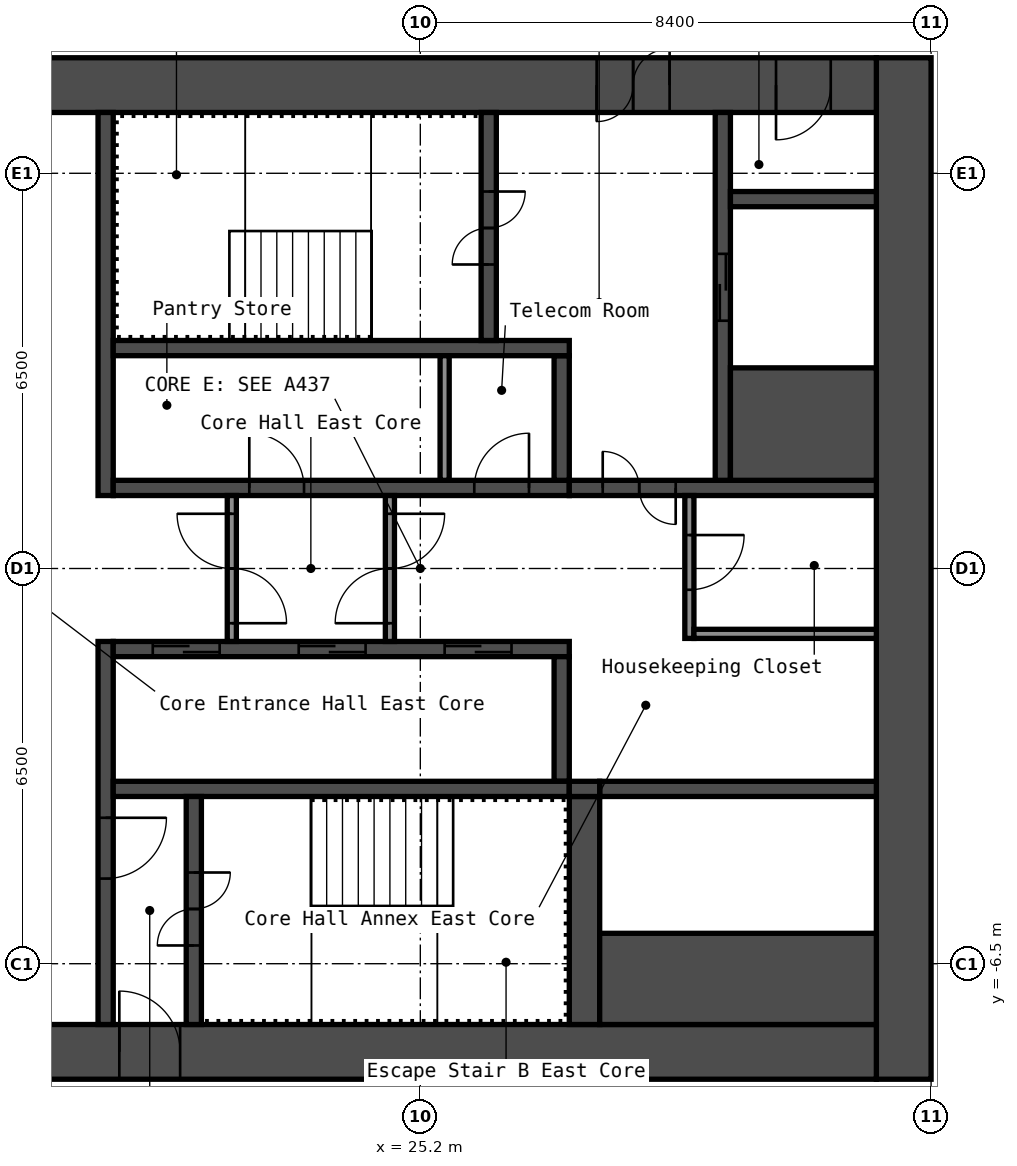
"""IFC4 building model, lengths in metres.
Left out: names, types, materials, properties, quantities, classifications, styles, units other than length and angle.
Written with IfcOpenShell. Run it as: python <this file> out.ifc"""

import sys

from ifc_helpers import new_model, si_unit, direction, frame, frame_2d, origin, place, context, subcontext, project, spatial, rectangle, extrude, element, fill, save


model = new_model("IFC4")
c1 = context("Model", 3, precision=1e-05, world=origin(), true_north=direction((0.0, 1.0)))
c2 = subcontext(c1, "Body", "Model", "MODEL_VIEW")
j1 = project(units=[si_unit("LENGTHUNIT", "METRE"), si_unit("PLANEANGLEUNIT", "RADIAN")], contexts=[c1])
p1 = place(None, origin())
s1 = spatial("IfcSite", under=j1, at=p1, CompositionType="ELEMENT")
p2 = place(p1, origin())
s2 = spatial("IfcBuilding", under=s1, at=p2, CompositionType="ELEMENT")
p3 = place(p2, frame((0.0, 0.0, 261.4)))
s3 = spatial("IfcBuildingStorey", under=s2, at=p3, CompositionType="ELEMENT", Elevation=261.4)
p4 = place(p3, frame((33.15, -8.4, 0.0), z_axis=(0.0, 0.0, 1.0), x_axis=(0.0, 1.0, 0.0)))
e1 = element("IfcWall", 1, at=p4, inside=s3, PredefinedType="SHEAR", context=c2, shape_type="SweptSolid", body=[
    extrude(rectangle(XDim=16.8, YDim=0.9, at=frame_2d((8.4, 0.0))), origin(), (0.0, 0.0, 1.0), 2.75),
])
p5 = place(p3, frame((17.7, 7.95, 0.0), z_axis=(0.0, 0.0, 1.0), x_axis=(1.0, 0.0, 0.0)))
e2 = element("IfcWall", 2, at=p5, inside=s3, PredefinedType="SHEAR", context=c2, shape_type="SweptSolid", body=[
    extrude(rectangle(XDim=15.0, YDim=0.9, at=frame_2d((7.5, 0.0))), origin(), (0.0, 0.0, 1.0), 2.75),
])
p6 = place(p5, frame((10.4, 0.0, 0.0)))
e3 = element("IfcOpeningElement", 3, at=p6, cuts=e2, PredefinedType="OPENING", context=c2, shape_type="SweptSolid", body=[
    extrude(rectangle(XDim=1.2, YDim=2.1, at=frame_2d((0.6, 1.05))), frame((0.0, 0.46, 0.0), z_axis=(0.0, -1.0, 0.0), x_axis=(1.0, 0.0, 0.0)), (0.0, 0.0, 1.0), 0.92),
])
p7 = place(p5, frame((13.35, 0.0, 0.0)))
e4 = element("IfcOpeningElement", 4, at=p7, cuts=e2, PredefinedType="OPENING", context=c2, shape_type="SweptSolid", body=[
    extrude(rectangle(XDim=0.9, YDim=2.1, at=frame_2d((0.45, 1.05))), frame((0.0, 0.46, 0.0), z_axis=(0.0, -1.0, 0.0), x_axis=(1.0, 0.0, 0.0)), (0.0, 0.0, 1.0), 0.92),
])
p8 = place(p3, frame((17.7, -7.95, 0.0), z_axis=(0.0, 0.0, 1.0), x_axis=(1.0, 0.0, 0.0)))
e5 = element("IfcWall", 5, at=p8, inside=s3, PredefinedType="SHEAR", context=c2, shape_type="SweptSolid", body=[
    extrude(rectangle(XDim=15.0, YDim=0.9, at=frame_2d((7.5, 0.0))), origin(), (0.0, 0.0, 1.0), 2.75),
])
p9 = place(p8, frame((2.55, 0.0, 0.0)))
e6 = element("IfcOpeningElement", 6, at=p9, cuts=e5, PredefinedType="OPENING", context=c2, shape_type="SweptSolid", body=[
    extrude(rectangle(XDim=1.0, YDim=2.1, at=frame_2d((0.5, 1.05))), frame((0.0, 0.46, 0.0), z_axis=(0.0, -1.0, 0.0), x_axis=(1.0, 0.0, 0.0)), (0.0, 0.0, 1.0), 0.92),
])
p10 = place(p3, frame((20.025, 1.2, 0.0), z_axis=(0.0, 0.0, 1.0), x_axis=(0.0, 1.0, 0.0)))
e7 = element("IfcWall", 7, at=p10, inside=s3, PredefinedType="SHEAR", context=c2, shape_type="SweptSolid", body=[
    extrude(rectangle(XDim=6.3, YDim=0.25, at=frame_2d((3.15, 0.0))), origin(), (0.0, 0.0, 1.0), 2.75),
])
p11 = place(p3, frame((20.025, -7.5, 0.0), z_axis=(0.0, 0.0, 1.0), x_axis=(0.0, 1.0, 0.0)))
e8 = element("IfcWall", 8, at=p11, inside=s3, PredefinedType="SHEAR", context=c2, shape_type="SweptSolid", body=[
    extrude(rectangle(XDim=6.3, YDim=0.25, at=frame_2d((3.15, 0.0))), origin(), (0.0, 0.0, 1.0), 2.75),
])
p12 = place(p11, frame((2.4, 0.0, 0.0)))
e9 = element("IfcOpeningElement", 9, at=p12, cuts=e8, PredefinedType="OPENING", context=c2, shape_type="SweptSolid", body=[
    extrude(rectangle(XDim=1.0, YDim=2.1, at=frame_2d((0.5, 1.05))), frame((0.0, 0.135, 0.0), z_axis=(0.0, -1.0, 0.0), x_axis=(1.0, 0.0, 0.0)), (0.0, 0.0, 1.0), 0.27),
])
p13 = place(p3, frame((20.15, 1.325, 0.0), z_axis=(0.0, 0.0, 1.0), x_axis=(1.0, 0.0, 0.0)))
e10 = element("IfcWall", 10, at=p13, inside=s3, PredefinedType="SHEAR", context=c2, shape_type="SweptSolid", body=[
    extrude(rectangle(XDim=7.5, YDim=0.25, at=frame_2d((3.75, 0.0))), origin(), (0.0, 0.0, 1.0), 2.75),
])
p14 = place(p13, frame((2.238, 0.0, 0.0)))
e11 = element("IfcOpeningElement", 11, at=p14, cuts=e10, PredefinedType="OPENING", context=c2, shape_type="SweptSolid", body=[
    extrude(rectangle(XDim=0.9, YDim=2.1, at=frame_2d((0.45, 1.05))), frame((0.0, 0.135, 0.0), z_axis=(0.0, -1.0, 0.0), x_axis=(1.0, 0.0, 0.0)), (0.0, 0.0, 1.0), 0.27),
])
p15 = place(p13, frame((5.938, 0.0, 0.0)))
e12 = element("IfcOpeningElement", 12, at=p15, cuts=e10, PredefinedType="OPENING", context=c2, shape_type="SweptSolid", body=[
    extrude(rectangle(XDim=0.9, YDim=2.1, at=frame_2d((0.45, 1.05))), frame((0.0, 0.135, 0.0), z_axis=(0.0, -1.0, 0.0), x_axis=(1.0, 0.0, 0.0)), (0.0, 0.0, 1.0), 0.27),
])
p16 = place(p3, frame((27.525, 1.45, 0.0), z_axis=(0.0, 0.0, 1.0), x_axis=(0.0, 1.0, 0.0)))
e13 = element("IfcWall", 13, at=p16, inside=s3, PredefinedType="SHEAR", context=c2, shape_type="SweptSolid", body=[
    extrude(rectangle(XDim=2.05, YDim=0.25, at=frame_2d((1.025, 0.0))), origin(), (0.0, 0.0, 1.0), 2.75),
])
p17 = place(p3, frame((20.15, 3.625, 0.0), z_axis=(0.0, 0.0, 1.0), x_axis=(1.0, 0.0, 0.0)))
e14 = element("IfcWall", 14, at=p17, inside=s3, PredefinedType="SHEAR", context=c2, shape_type="SweptSolid", body=[
    extrude(rectangle(XDim=7.5, YDim=0.25, at=frame_2d((3.75, 0.0))), origin(), (0.0, 0.0, 1.0), 2.75),
])
p18 = place(p3, frame((26.325, 3.75, 0.0), z_axis=(0.0, 0.0, 1.0), x_axis=(0.0, 1.0, 0.0)))
e15 = element("IfcWall", 15, at=p18, inside=s3, PredefinedType="SHEAR", context=c2, shape_type="SweptSolid", body=[
    extrude(rectangle(XDim=3.75, YDim=0.25, at=frame_2d((1.875, 0.0))), origin(), (0.0, 0.0, 1.0), 2.75),
])
p19 = place(p18, frame((1.25, 0.0, 0.0)))
e16 = element("IfcOpeningElement", 16, at=p19, cuts=e15, PredefinedType="OPENING", context=c2, shape_type="SweptSolid", body=[
    extrude(rectangle(XDim=1.2, YDim=2.1, at=frame_2d((0.6, 1.05))), frame((0.0, 0.135, 0.0), z_axis=(0.0, -1.0, 0.0), x_axis=(1.0, 0.0, 0.0)), (0.0, 0.0, 1.0), 0.27),
])
p20 = place(p3, frame((27.65, 1.325, 0.0), z_axis=(0.0, 0.0, 1.0), x_axis=(1.0, 0.0, 0.0)))
e17 = element("IfcWall", 17, at=p20, inside=s3, PredefinedType="SHEAR", context=c2, shape_type="SweptSolid", body=[
    extrude(rectangle(XDim=5.05, YDim=0.25, at=frame_2d((2.525, 0.0))), origin(), (0.0, 0.0, 1.0), 2.75),
])
p21 = place(p20, frame((0.55, 0.0, 0.0)))
e18 = element("IfcOpeningElement", 18, at=p21, cuts=e17, PredefinedType="OPENING", context=c2, shape_type="SweptSolid", body=[
    extrude(rectangle(XDim=1.2, YDim=2.1, at=frame_2d((0.6, 1.05))), frame((0.0, 0.135, 0.0), z_axis=(0.0, -1.0, 0.0), x_axis=(1.0, 0.0, 0.0)), (0.0, 0.0, 1.0), 0.27),
])
p22 = place(p3, frame((30.175, 1.45, 0.0), z_axis=(0.0, 0.0, 1.0), x_axis=(0.0, 1.0, 0.0)))
e19 = element("IfcWall", 19, at=p22, inside=s3, PredefinedType="SHEAR", context=c2, shape_type="SweptSolid", body=[
    extrude(rectangle(XDim=6.05, YDim=0.25, at=frame_2d((3.025, 0.0))), origin(), (0.0, 0.0, 1.0), 2.75),
])
p23 = place(p22, frame((2.625, 0.0, 0.0)))
e20 = element("IfcOpeningElement", 20, at=p23, cuts=e19, PredefinedType="OPENING", context=c2, shape_type="SweptSolid", body=[
    extrude(rectangle(XDim=1.1, YDim=2.1, at=frame_2d((0.55, 1.05))), frame((0.0, 0.135, 0.0), z_axis=(0.0, -1.0, 0.0), x_axis=(1.0, 0.0, 0.0)), (0.0, 0.0, 1.0), 0.27),
])
p24 = place(p3, frame((30.3, 2.375, 0.0), z_axis=(0.0, 0.0, 1.0), x_axis=(1.0, 0.0, 0.0)))
e21 = element("IfcWall", 21, at=p24, inside=s3, PredefinedType="SHEAR", context=c2, shape_type="SweptSolid", body=[
    extrude(rectangle(XDim=2.4, YDim=1.85, at=frame_2d((1.2, 0.0))), origin(), (0.0, 0.0, 1.0), 2.75),
])
p25 = place(p3, frame((30.3, 6.075, 0.0), z_axis=(0.0, 0.0, 1.0), x_axis=(1.0, 0.0, 0.0)))
e22 = element("IfcWall", 22, at=p25, inside=s3, PredefinedType="SHEAR", context=c2, shape_type="SweptSolid", body=[
    extrude(rectangle(XDim=2.4, YDim=0.25, at=frame_2d((1.2, 0.0))), origin(), (0.0, 0.0, 1.0), 2.75),
])
p26 = place(p3, frame((20.15, -1.325, 0.0), z_axis=(0.0, 0.0, 1.0), x_axis=(1.0, 0.0, 0.0)))
e23 = element("IfcWall", 23, at=p26, inside=s3, PredefinedType="SHEAR", context=c2, shape_type="SweptSolid", body=[
    extrude(rectangle(XDim=7.5, YDim=0.25, at=frame_2d((3.75, 0.0))), origin(), (0.0, 0.0, 1.0), 2.75),
])
p27 = place(p26, frame((0.65, 0.0, 0.0)))
e24 = element("IfcOpeningElement", 24, at=p27, cuts=e23, PredefinedType="OPENING", context=c2, shape_type="SweptSolid", body=[
    extrude(rectangle(XDim=1.1, YDim=2.1, at=frame_2d((0.55, 1.05))), frame((0.0, 0.135, 0.0), z_axis=(0.0, -1.0, 0.0), x_axis=(1.0, 0.0, 0.0)), (0.0, 0.0, 1.0), 0.27),
])
p28 = place(p26, frame((3.05, 0.0, 0.0)))
e25 = element("IfcOpeningElement", 25, at=p28, cuts=e23, PredefinedType="OPENING", context=c2, shape_type="SweptSolid", body=[
    extrude(rectangle(XDim=1.1, YDim=2.1, at=frame_2d((0.55, 1.05))), frame((0.0, 0.135, 0.0), z_axis=(0.0, -1.0, 0.0), x_axis=(1.0, 0.0, 0.0)), (0.0, 0.0, 1.0), 0.27),
])
p29 = place(p26, frame((5.45, 0.0, 0.0)))
e26 = element("IfcOpeningElement", 26, at=p29, cuts=e23, PredefinedType="OPENING", context=c2, shape_type="SweptSolid", body=[
    extrude(rectangle(XDim=1.1, YDim=2.1, at=frame_2d((0.55, 1.05))), frame((0.0, 0.135, 0.0), z_axis=(0.0, -1.0, 0.0), x_axis=(1.0, 0.0, 0.0)), (0.0, 0.0, 1.0), 0.27),
])
p30 = place(p3, frame((27.525, -3.5, 0.0), z_axis=(0.0, 0.0, 1.0), x_axis=(0.0, 1.0, 0.0)))
e27 = element("IfcWall", 27, at=p30, inside=s3, PredefinedType="SHEAR", context=c2, shape_type="SweptSolid", body=[
    extrude(rectangle(XDim=2.05, YDim=0.25, at=frame_2d((1.025, 0.0))), origin(), (0.0, 0.0, 1.0), 2.75),
])
p31 = place(p3, frame((20.15, -3.625, 0.0), z_axis=(0.0, 0.0, 1.0), x_axis=(1.0, 0.0, 0.0)))
e28 = element("IfcWall", 28, at=p31, inside=s3, PredefinedType="SHEAR", context=c2, shape_type="SweptSolid", body=[
    extrude(rectangle(XDim=7.5, YDim=0.25, at=frame_2d((3.75, 0.0))), origin(), (0.0, 0.0, 1.0), 2.75),
])
p32 = place(p3, frame((21.475, -7.5, 0.0), z_axis=(0.0, 0.0, 1.0), x_axis=(0.0, 1.0, 0.0)))
e29 = element("IfcWall", 29, at=p32, inside=s3, PredefinedType="SHEAR", context=c2, shape_type="SweptSolid", body=[
    extrude(rectangle(XDim=3.75, YDim=0.25, at=frame_2d((1.875, 0.0))), origin(), (0.0, 0.0, 1.0), 2.75),
])
p33 = place(p32, frame((1.3, 0.0, 0.0)))
e30 = element("IfcOpeningElement", 30, at=p33, cuts=e29, PredefinedType="OPENING", context=c2, shape_type="SweptSolid", body=[
    extrude(rectangle(XDim=1.2, YDim=2.1, at=frame_2d((0.6, 1.05))), frame((0.0, 0.135, 0.0), z_axis=(0.0, -1.0, 0.0), x_axis=(1.0, 0.0, 0.0)), (0.0, 0.0, 1.0), 0.27),
])
p34 = place(p3, frame((27.9, -7.5, 0.0), z_axis=(0.0, 0.0, 1.0), x_axis=(0.0, 1.0, 0.0)))
e31 = element("IfcWall", 31, at=p34, inside=s3, PredefinedType="SHEAR", context=c2, shape_type="SweptSolid", body=[
    extrude(rectangle(XDim=3.75, YDim=0.5, at=frame_2d((1.875, 0.0))), origin(), (0.0, 0.0, 1.0), 2.75),
])
p35 = place(p3, frame((28.15, -3.625, 0.0), z_axis=(0.0, 0.0, 1.0), x_axis=(1.0, 0.0, 0.0)))
e32 = element("IfcWall", 32, at=p35, inside=s3, PredefinedType="SHEAR", context=c2, shape_type="SweptSolid", body=[
    extrude(rectangle(XDim=4.55, YDim=0.25, at=frame_2d((2.275, 0.0))), origin(), (0.0, 0.0, 1.0), 2.75),
])
p36 = place(p3, frame((28.15, -6.75, 0.0), z_axis=(0.0, 0.0, 1.0), x_axis=(1.0, 0.0, 0.0)))
e33 = element("IfcWall", 33, at=p36, inside=s3, PredefinedType="SHEAR", context=c2, shape_type="SweptSolid", body=[
    extrude(rectangle(XDim=4.55, YDim=1.5, at=frame_2d((2.275, 0.0))), origin(), (0.0, 0.0, 1.0), 2.75),
])
p37 = place(p3, frame((27.65, -3.625, 0.0), z_axis=(0.0, 0.0, 1.0), x_axis=(1.0, 0.0, 0.0)))
e34 = element("IfcWall", 34, at=p37, inside=s3, PredefinedType="SHEAR", context=c2, shape_type="SweptSolid", body=[
    extrude(rectangle(XDim=0.5, YDim=0.25, at=frame_2d((0.25, 0.0))), origin(), (0.0, 0.0, 1.0), 2.75),
])
p38 = place(p3, frame((22.1, -1.2, 0.0), z_axis=(0.0, 0.0, 1.0), x_axis=(0.0, 1.0, 0.0)))
e35 = element("IfcWall", 35, at=p38, inside=s3, PredefinedType="PARTITIONING", context=c2, shape_type="SweptSolid", body=[
    extrude(rectangle(XDim=2.4, YDim=0.15, at=frame_2d((1.2, 0.0))), origin(), (0.0, 0.0, 1.0), 2.75),
])
p39 = place(p38, frame((0.3, 0.0, 0.0)))
e36 = element("IfcOpeningElement", 36, at=p39, cuts=e35, PredefinedType="OPENING", context=c2, shape_type="SweptSolid", body=[
    extrude(rectangle(XDim=1.8, YDim=2.1, at=frame_2d((0.9, 1.05))), frame((0.0, 0.085, 0.0), z_axis=(0.0, -1.0, 0.0), x_axis=(1.0, 0.0, 0.0)), (0.0, 0.0, 1.0), 0.17),
])
p40 = place(p3, frame((24.7, -1.2, 0.0), z_axis=(0.0, 0.0, 1.0), x_axis=(0.0, 1.0, 0.0)))
e37 = element("IfcWall", 37, at=p40, inside=s3, PredefinedType="PARTITIONING", context=c2, shape_type="SweptSolid", body=[
    extrude(rectangle(XDim=2.4, YDim=0.15, at=frame_2d((1.2, 0.0))), origin(), (0.0, 0.0, 1.0), 2.75),
])
p41 = place(p40, frame((0.3, 0.0, 0.0)))
e38 = element("IfcOpeningElement", 38, at=p41, cuts=e37, PredefinedType="OPENING", context=c2, shape_type="SweptSolid", body=[
    extrude(rectangle(XDim=1.8, YDim=2.1, at=frame_2d((0.9, 1.05))), frame((0.0, 0.085, 0.0), z_axis=(0.0, -1.0, 0.0), x_axis=(1.0, 0.0, 0.0)), (0.0, 0.0, 1.0), 0.17),
])
p42 = place(p3, frame((29.625, -1.15, 0.0), z_axis=(0.0, 0.0, 1.0), x_axis=(0.0, 1.0, 0.0)))
e39 = element("IfcWall", 39, at=p42, inside=s3, PredefinedType="PARTITIONING", context=c2, shape_type="SweptSolid", body=[
    extrude(rectangle(XDim=2.35, YDim=0.15, at=frame_2d((1.175, 0.0))), origin(), (0.0, 0.0, 1.0), 2.75),
])
p43 = place(p42, frame((0.8, 0.0, 0.0)))
e40 = element("IfcOpeningElement", 40, at=p43, cuts=e39, PredefinedType="OPENING", context=c2, shape_type="SweptSolid", body=[
    extrude(rectangle(XDim=0.9, YDim=2.1, at=frame_2d((0.45, 1.05))), frame((0.0, 0.085, 0.0), z_axis=(0.0, -1.0, 0.0), x_axis=(1.0, 0.0, 0.0)), (0.0, 0.0, 1.0), 0.17),
])
p44 = place(p3, frame((29.7, -1.075, 0.0), z_axis=(0.0, 0.0, 1.0), x_axis=(1.0, 0.0, 0.0)))
e41 = element("IfcWall", 41, at=p44, inside=s3, PredefinedType="PARTITIONING", context=c2, shape_type="SweptSolid", body=[
    extrude(rectangle(XDim=3.0, YDim=0.15, at=frame_2d((1.5, 0.0))), origin(), (0.0, 0.0, 1.0), 2.75),
])
p45 = place(p3, frame((25.6, 1.45, 0.0), z_axis=(0.0, 0.0, 1.0), x_axis=(0.0, 1.0, 0.0)))
e42 = element("IfcWall", 42, at=p45, inside=s3, PredefinedType="PARTITIONING", context=c2, shape_type="SweptSolid", body=[
    extrude(rectangle(XDim=2.05, YDim=0.15, at=frame_2d((1.025, 0.0))), origin(), (0.0, 0.0, 1.0), 2.75),
])
p46 = place(p6, origin())
e43 = element("IfcDoor", 43, at=p46, inside=s3, OperationType="DOUBLE_DOOR_SINGLE_SWING", PredefinedType="DOOR", context=c2, shape_type="SweptSolid", body=[
    extrude(rectangle(XDim=1.2, YDim=2.1, at=frame_2d((0.6, 1.05))), frame((0.0, 0.025, 0.0), z_axis=(0.0, -1.0, 0.0), x_axis=(1.0, 0.0, 0.0)), (0.0, 0.0, 1.0), 0.05),
])
fill(e3, e43)
p47 = place(p7, origin())
e44 = element("IfcDoor", 44, at=p47, inside=s3, OperationType="SINGLE_SWING_LEFT", PredefinedType="DOOR", context=c2, shape_type="SweptSolid", body=[
    extrude(rectangle(XDim=0.9, YDim=2.1, at=frame_2d((0.45, 1.05))), frame((0.0, 0.025, 0.0), z_axis=(0.0, -1.0, 0.0), x_axis=(1.0, 0.0, 0.0)), (0.0, 0.0, 1.0), 0.05),
])
fill(e4, e44)
p48 = place(p9, origin())
e45 = element("IfcDoor", 45, at=p48, inside=s3, OperationType="SINGLE_SWING_RIGHT", PredefinedType="DOOR", context=c2, shape_type="SweptSolid", body=[
    extrude(rectangle(XDim=1.0, YDim=2.1, at=frame_2d((0.5, 1.05))), frame((0.0, 0.025, 0.0), z_axis=(0.0, -1.0, 0.0), x_axis=(1.0, 0.0, 0.0)), (0.0, 0.0, 1.0), 0.05),
])
fill(e6, e45)
p49 = place(p19, origin())
e46 = element("IfcDoor", 46, at=p49, inside=s3, OperationType="DOUBLE_DOOR_SINGLE_SWING", PredefinedType="DOOR", context=c2, shape_type="SweptSolid", body=[
    extrude(rectangle(XDim=1.2, YDim=2.1, at=frame_2d((0.6, 1.05))), frame((0.0, 0.025, 0.0), z_axis=(0.0, -1.0, 0.0), x_axis=(1.0, 0.0, 0.0)), (0.0, 0.0, 1.0), 0.05),
])
fill(e16, e46)
p50 = place(p33, origin())
e47 = element("IfcDoor", 47, at=p50, inside=s3, OperationType="DOUBLE_DOOR_SINGLE_SWING", PredefinedType="DOOR", context=c2, shape_type="SweptSolid", body=[
    extrude(rectangle(XDim=1.2, YDim=2.1, at=frame_2d((0.6, 1.05))), frame((0.0, 0.025, 0.0), z_axis=(0.0, -1.0, 0.0), x_axis=(1.0, 0.0, 0.0)), (0.0, 0.0, 1.0), 0.05),
])
fill(e30, e47)
p51 = place(p12, origin())
e48 = element("IfcDoor", 48, at=p51, inside=s3, OperationType="SINGLE_SWING_RIGHT", PredefinedType="DOOR", context=c2, shape_type="SweptSolid", body=[
    extrude(rectangle(XDim=1.0, YDim=2.1, at=frame_2d((0.5, 1.05))), frame((0.0, 0.025, 0.0), z_axis=(0.0, -1.0, 0.0), x_axis=(1.0, 0.0, 0.0)), (0.0, 0.0, 1.0), 0.05),
])
fill(e9, e48)
p52 = place(p21, origin())
e49 = element("IfcDoor", 49, at=p52, inside=s3, OperationType="DOUBLE_DOOR_SINGLE_SWING", PredefinedType="DOOR", context=c2, shape_type="SweptSolid", body=[
    extrude(rectangle(XDim=1.2, YDim=2.1, at=frame_2d((0.6, 1.05))), frame((0.0, 0.025, 0.0), z_axis=(0.0, -1.0, 0.0), x_axis=(1.0, 0.0, 0.0)), (0.0, 0.0, 1.0), 0.05),
])
fill(e18, e49)
p53 = place(p39, origin())
e50 = element("IfcDoor", 50, at=p53, inside=s3, OperationType="DOUBLE_DOOR_SINGLE_SWING", PredefinedType="DOOR", context=c2, shape_type="SweptSolid", body=[
    extrude(rectangle(XDim=1.8, YDim=2.1, at=frame_2d((0.9, 1.05))), frame((0.0, 0.025, 0.0), z_axis=(0.0, -1.0, 0.0), x_axis=(1.0, 0.0, 0.0)), (0.0, 0.0, 1.0), 0.05),
])
fill(e36, e50)
p54 = place(p41, origin())
e51 = element("IfcDoor", 51, at=p54, inside=s3, OperationType="DOUBLE_DOOR_SINGLE_SWING", PredefinedType="DOOR", context=c2, shape_type="SweptSolid", body=[
    extrude(rectangle(XDim=1.8, YDim=2.1, at=frame_2d((0.9, 1.05))), frame((0.0, 0.025, 0.0), z_axis=(0.0, -1.0, 0.0), x_axis=(1.0, 0.0, 0.0)), (0.0, 0.0, 1.0), 0.05),
])
fill(e38, e51)
p55 = place(p43, origin())
e52 = element("IfcDoor", 52, at=p55, inside=s3, OperationType="SINGLE_SWING_RIGHT", PredefinedType="DOOR", context=c2, shape_type="SweptSolid", body=[
    extrude(rectangle(XDim=0.9, YDim=2.1, at=frame_2d((0.45, 1.05))), frame((0.0, 0.025, 0.0), z_axis=(0.0, -1.0, 0.0), x_axis=(1.0, 0.0, 0.0)), (0.0, 0.0, 1.0), 0.05),
])
fill(e40, e52)
p56 = place(p14, origin())
e53 = element("IfcDoor", 53, at=p56, inside=s3, OperationType="SINGLE_SWING_RIGHT", PredefinedType="DOOR", context=c2, shape_type="SweptSolid", body=[
    extrude(rectangle(XDim=0.9, YDim=2.1, at=frame_2d((0.45, 1.05))), frame((0.0, 0.025, 0.0), z_axis=(0.0, -1.0, 0.0), x_axis=(1.0, 0.0, 0.0)), (0.0, 0.0, 1.0), 0.05),
])
fill(e11, e53)
p57 = place(p15, origin())
e54 = element("IfcDoor", 54, at=p57, inside=s3, OperationType="SINGLE_SWING_LEFT", PredefinedType="DOOR", context=c2, shape_type="SweptSolid", body=[
    extrude(rectangle(XDim=0.9, YDim=2.1, at=frame_2d((0.45, 1.05))), frame((0.0, 0.025, 0.0), z_axis=(0.0, -1.0, 0.0), x_axis=(1.0, 0.0, 0.0)), (0.0, 0.0, 1.0), 0.05),
])
fill(e12, e54)
p58 = place(p27, origin())
e55 = element("IfcDoor", 55, at=p58, inside=s3, OperationType="DOUBLE_DOOR_SLIDING", PredefinedType="DOOR", context=c2, shape_type="SweptSolid", body=[
    extrude(rectangle(XDim=1.1, YDim=2.1, at=frame_2d((0.55, 1.05))), frame((0.0, 0.025, 0.0), z_axis=(0.0, -1.0, 0.0), x_axis=(1.0, 0.0, 0.0)), (0.0, 0.0, 1.0), 0.05),
])
fill(e24, e55)
p59 = place(p28, origin())
e56 = element("IfcDoor", 56, at=p59, inside=s3, OperationType="DOUBLE_DOOR_SLIDING", PredefinedType="DOOR", context=c2, shape_type="SweptSolid", body=[
    extrude(rectangle(XDim=1.1, YDim=2.1, at=frame_2d((0.55, 1.05))), frame((0.0, 0.025, 0.0), z_axis=(0.0, -1.0, 0.0), x_axis=(1.0, 0.0, 0.0)), (0.0, 0.0, 1.0), 0.05),
])
fill(e25, e56)
p60 = place(p29, origin())
e57 = element("IfcDoor", 57, at=p60, inside=s3, OperationType="DOUBLE_DOOR_SLIDING", PredefinedType="DOOR", context=c2, shape_type="SweptSolid", body=[
    extrude(rectangle(XDim=1.1, YDim=2.1, at=frame_2d((0.55, 1.05))), frame((0.0, 0.025, 0.0), z_axis=(0.0, -1.0, 0.0), x_axis=(1.0, 0.0, 0.0)), (0.0, 0.0, 1.0), 0.05),
])
fill(e26, e57)
p61 = place(p23, origin())
e58 = element("IfcDoor", 58, at=p61, inside=s3, OperationType="DOUBLE_DOOR_SLIDING", PredefinedType="DOOR", context=c2, shape_type="SweptSolid", body=[
    extrude(rectangle(XDim=1.1, YDim=2.1, at=frame_2d((0.55, 1.05))), frame((0.0, 0.025, 0.0), z_axis=(0.0, -1.0, 0.0), x_axis=(1.0, 0.0, 0.0)), (0.0, 0.0, 1.0), 0.05),
])
fill(e20, e58)
save(model, sys.argv[1])
